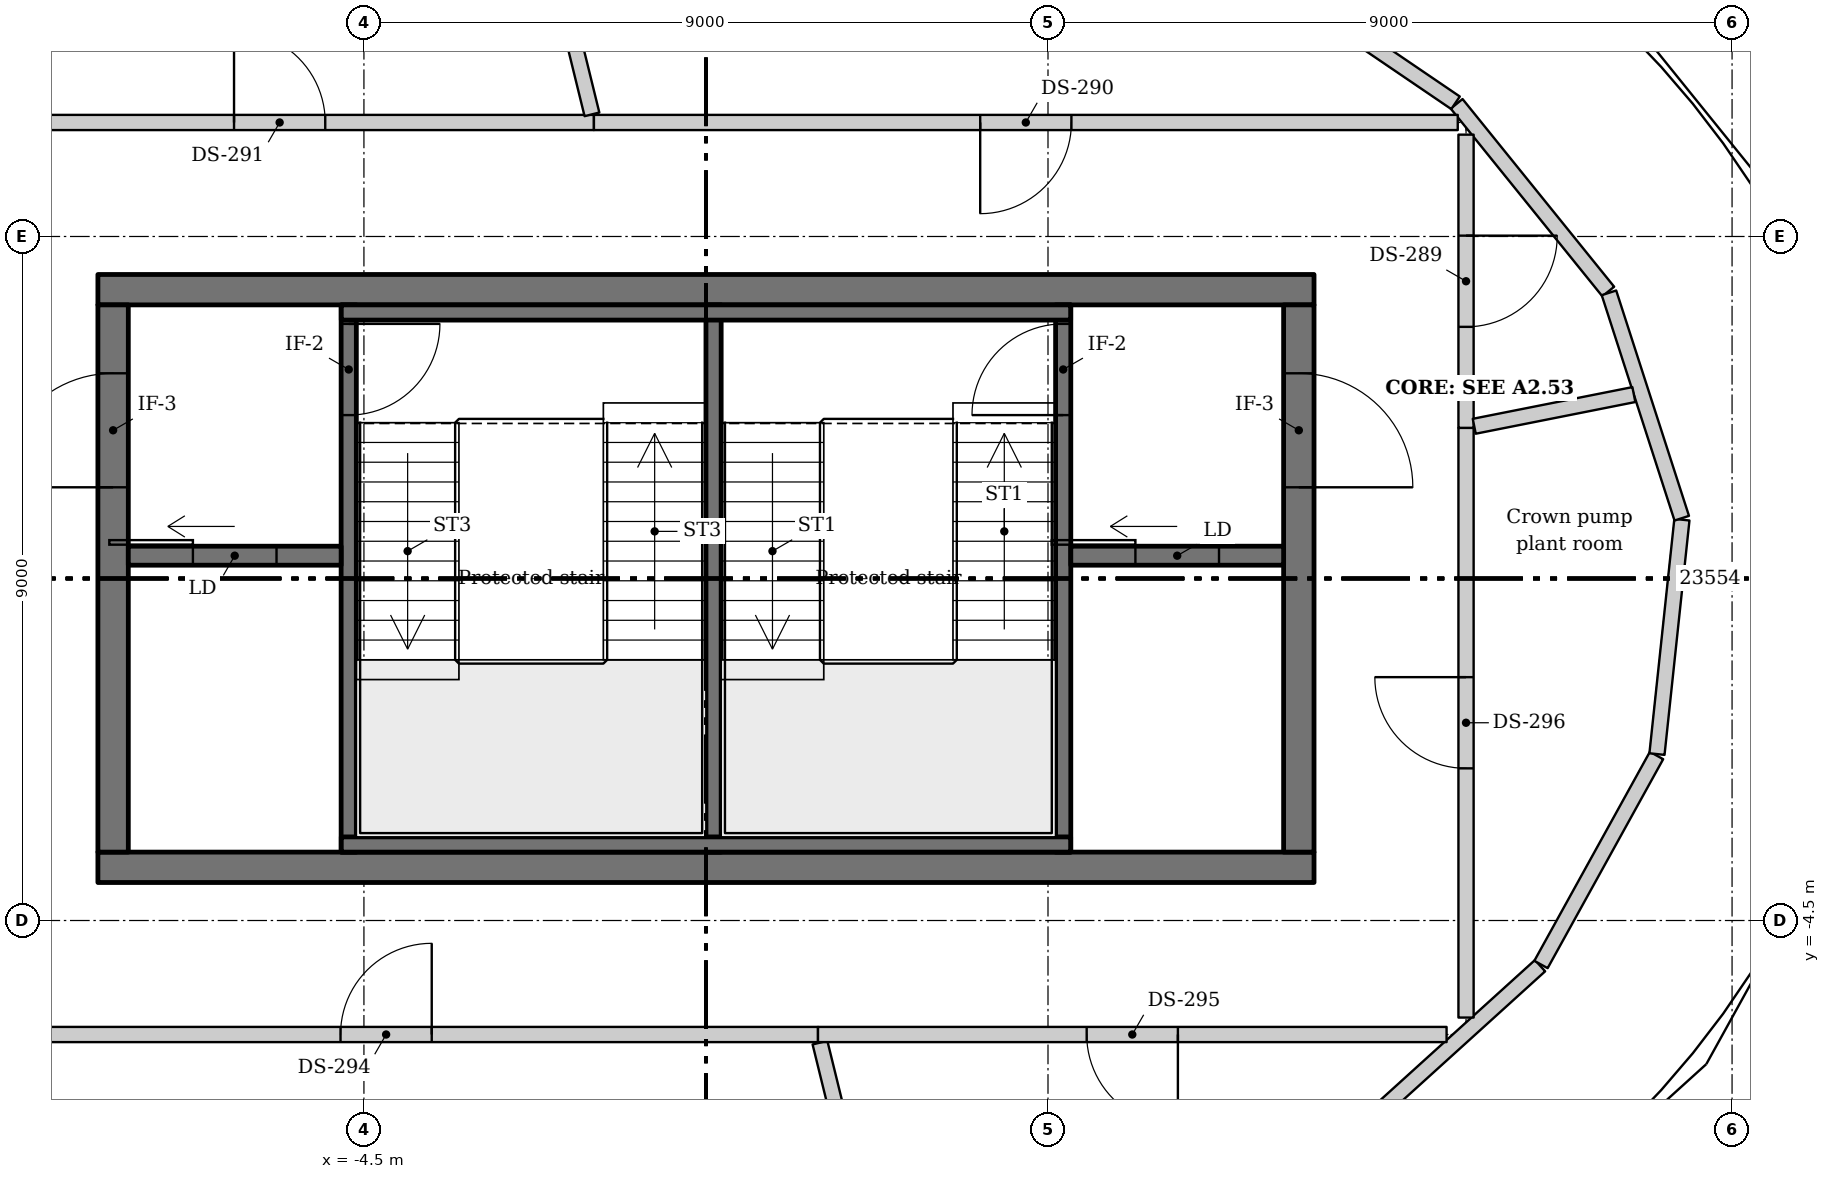
"""IFC4 building model, lengths in metres.
Left out: names, types, materials, properties, quantities, classifications, styles, units other than length and angle.
Written with IfcOpenShell. Run it as: python <this file> out.ifc"""

import sys

from ifc_helpers import new_model, si_unit, direction, frame, frame_2d, origin, place, context, subcontext, project, spatial, rectangle, extrude, source, transform, mapped, element, fill, save


model = new_model("IFC4")
c1 = context("Model", 3, precision=1e-05, world=origin(), true_north=direction((0.0, 1.0)))
c2 = subcontext(c1, "Body", "Model", "MODEL_VIEW")
j1 = project(units=[si_unit("LENGTHUNIT", "METRE"), si_unit("PLANEANGLEUNIT", "RADIAN")], contexts=[c1])
p1 = place(None, origin())
s1 = spatial("IfcSite", under=j1, at=p1, CompositionType="ELEMENT")
p2 = place(p1, origin())
s2 = spatial("IfcBuilding", under=s1, at=p2, CompositionType="ELEMENT")
p3 = place(p2, frame((0.0, 0.0, 365.5)))
s3 = spatial("IfcBuildingStorey", under=s2, at=p3, CompositionType="ELEMENT", Elevation=365.5)
m1 = source(origin(), c2, "Body", "SweptSolid", [
    extrude(rectangle(XDim=16.0, YDim=0.4, at=frame_2d((8.0, 0.0))), origin(), (0.0, 0.0, 1.0), 4.5),
])
for number, where, z_axis, x_axis in (
    (1, (-8.0, 3.8, -0.25), (0.0, 0.0, 1.0), (1.0, 0.0, 0.0)),
    (2, (-8.0, -3.8, -0.25), (0.0, 0.0, 1.0), (1.0, 0.0, 0.0)),
):
    element("IfcWall", number, at=place(p3, frame(where, z_axis=z_axis, x_axis=x_axis)), inside=s3, PredefinedType="SHEAR", context=c2, shape_type="MappedRepresentation", body=[
        mapped(m1, transform((0.0, 0.0, 0.0))),
    ])
m2 = source(origin(), c2, "Body", "SweptSolid", [
    extrude(rectangle(XDim=7.2, YDim=0.4, at=frame_2d((3.6, 0.0))), origin(), (0.0, 0.0, 1.0), 4.5),
])
p4 = place(p3, frame((7.8, -3.6, -0.25), z_axis=(0.0, 0.0, 1.0), x_axis=(0.0, 1.0, 0.0)))
e3 = element("IfcWall", 3, at=p4, inside=s3, PredefinedType="SHEAR", context=c2, shape_type="MappedRepresentation", body=[
    mapped(m2, transform((0.0, 0.0, 0.0))),
])
m3 = source(origin(), c2, "Body", "SweptSolid", [
    extrude(rectangle(XDim=1.5, YDim=2.1, at=frame_2d((0.75, 1.05))), frame((0.0, 0.21, 0.0), z_axis=(0.0, -1.0, 0.0), x_axis=(1.0, 0.0, 0.0)), (0.0, 0.0, 1.0), 0.42),
])
p5 = place(p4, frame((4.8, 0.0, 0.25)))
e4 = element("IfcOpeningElement", 4, at=p5, cuts=e3, PredefinedType="OPENING", context=c2, shape_type="MappedRepresentation", body=[
    mapped(m3, transform((0.0, 0.0, 0.0))),
])
p6 = place(p3, frame((-7.8, -3.6, -0.25), z_axis=(0.0, 0.0, 1.0), x_axis=(0.0, 1.0, 0.0)))
e5 = element("IfcWall", 5, at=p6, inside=s3, PredefinedType="SHEAR", context=c2, shape_type="MappedRepresentation", body=[
    mapped(m2, transform((0.0, 0.0, 0.0))),
])
p7 = place(p6, frame((4.8, 0.0, 0.25)))
e6 = element("IfcOpeningElement", 6, at=p7, cuts=e5, PredefinedType="OPENING", context=c2, shape_type="MappedRepresentation", body=[
    mapped(m3, transform((0.0, 0.0, 0.0))),
])
m4 = source(origin(), c2, "Body", "SweptSolid", [
    extrude(rectangle(XDim=3.175, YDim=0.2, at=frame_2d((1.587, 0.0))), origin(), (0.0, 0.0, 1.0), 4.25),
])
p8 = place(p3, frame((9.876, 6.246, 0.0), z_axis=(0.0, 0.0, 1.0), x_axis=(0.628308465475, -0.777964312943, 0.0)))
e7 = element("IfcWall", 7, at=p8, inside=s3, PredefinedType="SOLIDWALL", context=c2, shape_type="MappedRepresentation", body=[
    mapped(m4, transform((0.0, 0.0, 0.0))),
])
m5 = source(origin(), c2, "Body", "SweptSolid", [
    extrude(rectangle(XDim=3.23, YDim=0.2, at=frame_2d((1.615, 0.0))), origin(), (0.0, 0.0, 1.0), 4.25),
])
p9 = place(p3, frame((7.191, 8.076, 0.0), z_axis=(0.0, 0.0, 1.0), x_axis=(0.826887140507, -0.562367901701, 0.0)))
e8 = element("IfcWall", 8, at=p9, inside=s3, PredefinedType="SOLIDWALL", context=c2, shape_type="MappedRepresentation", body=[
    mapped(m5, transform((0.0, 0.0, 0.0))),
])
m6 = source(origin(), c2, "Body", "SweptSolid", [
    extrude(rectangle(XDim=3.205, YDim=0.2, at=frame_2d((1.603, 0.0))), origin(), (0.0, 0.0, 1.0), 4.25),
])
p10 = place(p3, frame((-10.974, 5.094, 0.0), z_axis=(0.0, 0.0, 1.0), x_axis=(0.741131432131, 0.671359963289, 0.0)))
e9 = element("IfcWall", 9, at=p10, inside=s3, PredefinedType="SOLIDWALL", context=c2, shape_type="MappedRepresentation", body=[
    mapped(m6, transform((0.0, 0.0, 0.0))),
])
p11 = place(p3, frame((-7.191, -8.076, 0.0), z_axis=(0.0, 0.0, 1.0), x_axis=(-0.826887140507, 0.562367901701, 0.0)))
e10 = element("IfcWall", 10, at=p11, inside=s3, PredefinedType="SOLIDWALL", context=c2, shape_type="MappedRepresentation", body=[
    mapped(m5, transform((0.0, 0.0, 0.0))),
])
p12 = place(p3, frame((10.974, -5.094, 0.0), z_axis=(0.0, 0.0, 1.0), x_axis=(-0.741131432131, -0.671359963289, 0.0)))
e11 = element("IfcWall", 11, at=p12, inside=s3, PredefinedType="SOLIDWALL", context=c2, shape_type="MappedRepresentation", body=[
    mapped(m6, transform((0.0, 0.0, 0.0))),
])
m7 = source(origin(), c2, "Body", "SweptSolid", [
    extrude(rectangle(XDim=3.142, YDim=0.2, at=frame_2d((1.571, 0.0))), origin(), (0.0, 0.0, 1.0), 4.25),
])
p13 = place(p3, frame((12.506, -2.329, 0.0), z_axis=(0.0, 0.0, 1.0), x_axis=(-0.48375502956, -0.875203445706, 0.0)))
e12 = element("IfcWall", 12, at=p13, inside=s3, PredefinedType="SOLIDWALL", context=c2, shape_type="MappedRepresentation", body=[
    mapped(m7, transform((0.0, 0.0, 0.0))),
])
m8 = source(origin(), c2, "Body", "SweptSolid", [
    extrude(rectangle(XDim=3.101, YDim=0.2, at=frame_2d((1.551, 0.0))), origin(), (0.0, 0.0, 1.0), 4.25),
])
p14 = place(p3, frame((12.84, 0.774, 0.0), z_axis=(0.0, 0.0, 1.0), x_axis=(-0.105721464197, -0.994395782376, 0.0)))
e13 = element("IfcWall", 13, at=p14, inside=s3, PredefinedType="SOLIDWALL", context=c2, shape_type="MappedRepresentation", body=[
    mapped(m8, transform((0.0, 0.0, 0.0))),
])
m9 = source(origin(), c2, "Body", "SweptSolid", [
    extrude(rectangle(XDim=3.116, YDim=0.2, at=frame_2d((1.558, 0.0))), origin(), (0.0, 0.0, 1.0), 4.25),
])
p15 = place(p3, frame((11.881, 3.759, 0.0), z_axis=(0.0, 0.0, 1.0), x_axis=(0.307282044067, -0.951618487312, 0.0)))
e14 = element("IfcWall", 14, at=p15, inside=s3, PredefinedType="SOLIDWALL", context=c2, shape_type="MappedRepresentation", body=[
    mapped(m9, transform((0.0, 0.0, 0.0))),
])
m10 = source(origin(), c2, "Body", "SweptSolid", [
    extrude(rectangle(XDim=7.2, YDim=0.2, at=frame_2d((3.6, 0.0))), origin(), (0.0, 0.0, 1.0), 4.25),
])
p16 = place(p3, frame((0.1, 3.6, 0.0), z_axis=(0.0, 0.0, 1.0), x_axis=(0.0, -1.0, 0.0)))
e15 = element("IfcWall", 15, at=p16, inside=s3, PredefinedType="SHEAR", context=c2, shape_type="MappedRepresentation", body=[
    mapped(m10, transform((0.0, 0.0, 0.0))),
])
p17 = place(p3, frame((4.7, -3.6, 0.0), z_axis=(0.0, 0.0, 1.0), x_axis=(0.0, 1.0, 0.0)))
e16 = element("IfcWall", 16, at=p17, inside=s3, PredefinedType="SHEAR", context=c2, shape_type="MappedRepresentation", body=[
    mapped(m10, transform((0.0, 0.0, 0.0))),
])
m11 = source(origin(), c2, "Body", "SweptSolid", [
    extrude(rectangle(XDim=1.2, YDim=2.1, at=frame_2d((0.6, 1.05))), frame((0.0, 0.11, 0.0), z_axis=(0.0, -1.0, 0.0), x_axis=(1.0, 0.0, 0.0)), (0.0, 0.0, 1.0), 0.22),
])
p18 = place(p17, frame((5.75, 0.0, 0.0)))
e17 = element("IfcOpeningElement", 17, at=p18, cuts=e16, PredefinedType="OPENING", context=c2, shape_type="MappedRepresentation", body=[
    mapped(m11, transform((0.0, 0.0, 0.0))),
])
p19 = place(p3, frame((-4.7, 3.6, 0.0), z_axis=(0.0, 0.0, 1.0), x_axis=(0.0, -1.0, 0.0)))
e18 = element("IfcWall", 18, at=p19, inside=s3, PredefinedType="SHEAR", context=c2, shape_type="MappedRepresentation", body=[
    mapped(m10, transform((0.0, 0.0, 0.0))),
])
p20 = place(p19, frame((0.25, 0.0, 0.0)))
e19 = element("IfcOpeningElement", 19, at=p20, cuts=e18, PredefinedType="OPENING", context=c2, shape_type="MappedRepresentation", body=[
    mapped(m11, transform((0.0, 0.0, 0.0))),
])
m12 = source(origin(), c2, "Body", "SweptSolid", [
    extrude(rectangle(XDim=2.8, YDim=0.25, at=frame_2d((1.4, 0.0))), origin(), (0.0, 0.0, 1.0), 4.25),
])
p21 = place(p3, frame((7.6, 0.3, 0.0), z_axis=(0.0, 0.0, 1.0), x_axis=(-1.0, 0.0, 0.0)))
e20 = element("IfcWall", 20, at=p21, inside=s3, PredefinedType="SHEAR", context=c2, shape_type="MappedRepresentation", body=[
    mapped(m12, transform((0.0, 0.0, 0.0))),
])
m13 = source(origin(), c2, "Body", "SweptSolid", [
    extrude(rectangle(XDim=1.1, YDim=2.1, at=frame_2d((0.55, 1.05))), frame((0.0, 0.135, 0.0), z_axis=(0.0, -1.0, 0.0), x_axis=(1.0, 0.0, 0.0)), (0.0, 0.0, 1.0), 0.27),
])
p22 = place(p21, frame((0.85, 0.0, 0.0)))
e21 = element("IfcOpeningElement", 21, at=p22, cuts=e20, PredefinedType="OPENING", context=c2, shape_type="MappedRepresentation", body=[
    mapped(m13, transform((0.0, 0.0, 0.0))),
])
p23 = place(p3, frame((-4.8, 0.3, 0.0), z_axis=(0.0, 0.0, 1.0), x_axis=(-1.0, 0.0, 0.0)))
e22 = element("IfcWall", 22, at=p23, inside=s3, PredefinedType="SHEAR", context=c2, shape_type="MappedRepresentation", body=[
    mapped(m12, transform((0.0, 0.0, 0.0))),
])
p24 = place(p23, frame((0.85, 0.0, 0.0)))
e23 = element("IfcOpeningElement", 23, at=p24, cuts=e22, PredefinedType="OPENING", context=c2, shape_type="MappedRepresentation", body=[
    mapped(m13, transform((0.0, 0.0, 0.0))),
])
m14 = source(origin(), c2, "Body", "SweptSolid", [
    extrude(rectangle(XDim=9.596, YDim=0.2, at=frame_2d((4.798, 0.0))), origin(), (0.0, 0.0, 1.0), 4.25),
])
for number, where, z_axis, x_axis in (
    (24, (-4.798, -3.5, 0.0), (0.0, 0.0, 1.0), (1.0, 0.0, 0.0)),
    (25, (4.798, 3.5, 0.0), (0.0, 0.0, 1.0), (-1.0, 0.0, 0.0)),
):
    element("IfcWall", number, at=place(p3, frame(where, z_axis=z_axis, x_axis=x_axis)), inside=s3, PredefinedType="SHEAR", context=c2, shape_type="MappedRepresentation", body=[
        mapped(m14, transform((0.0, 0.0, 0.0))),
    ])
m15 = source(origin(), c2, "Body", "SweptSolid", [
    extrude(rectangle(XDim=8.27, YDim=0.2, at=frame_2d((4.135, 0.0))), origin(), (0.0, 0.0, 1.0), 4.25),
])
p25 = place(p3, frame((-9.744, 6.0, 0.0), z_axis=(0.0, 0.0, 1.0), x_axis=(1.0, 0.0, 0.0)))
e26 = element("IfcWall", 26, at=p25, inside=s3, PredefinedType="PARTITIONING", context=c2, shape_type="MappedRepresentation", body=[
    mapped(m15, transform((0.0, 0.0, 0.0))),
])
p26 = place(p25, frame((3.535, 0.0, 0.0)))
e27 = element("IfcOpeningElement", 27, at=p26, cuts=e26, PredefinedType="OPENING", context=c2, shape_type="MappedRepresentation", body=[
    mapped(m11, transform((0.0, 0.0, 0.0))),
])
m16 = source(origin(), c2, "Body", "SweptSolid", [
    extrude(rectangle(XDim=3.458, YDim=0.2, at=frame_2d((1.729, 0.0))), origin(), (0.0, 0.0, 1.0), 4.25),
])
p27 = place(p3, frame((-1.5, 6.107, 0.0), z_axis=(0.0, 0.0, 1.0), x_axis=(-0.238563284271, 0.971126953286, 0.0)))
e28 = element("IfcWall", 28, at=p27, inside=s3, PredefinedType="PARTITIONING", context=c2, shape_type="MappedRepresentation", body=[
    mapped(m16, transform((0.0, 0.0, 0.0))),
])
m17 = source(origin(), c2, "Body", "SweptSolid", [
    extrude(rectangle(XDim=11.365, YDim=0.2, at=frame_2d((5.683, 0.0))), origin(), (0.0, 0.0, 1.0), 4.25),
])
p28 = place(p3, frame((-1.474, 6.0, 0.0), z_axis=(0.0, 0.0, 1.0), x_axis=(1.0, 0.0, 0.0)))
e29 = element("IfcWall", 29, at=p28, inside=s3, PredefinedType="PARTITIONING", context=c2, shape_type="MappedRepresentation", body=[
    mapped(m17, transform((0.0, 0.0, 0.0))),
])
p29 = place(p28, frame((5.082, 0.0, 0.0)))
e30 = element("IfcOpeningElement", 30, at=p29, cuts=e29, PredefinedType="OPENING", context=c2, shape_type="MappedRepresentation", body=[
    mapped(m11, transform((0.0, 0.0, 0.0))),
])
p30 = place(p3, frame((1.474, -6.0, 0.0), z_axis=(0.0, 0.0, 1.0), x_axis=(-1.0, 0.0, 0.0)))
e31 = element("IfcWall", 31, at=p30, inside=s3, PredefinedType="PARTITIONING", context=c2, shape_type="MappedRepresentation", body=[
    mapped(m17, transform((0.0, 0.0, 0.0))),
])
p31 = place(p30, frame((5.082, 0.0, 0.0)))
e32 = element("IfcOpeningElement", 32, at=p31, cuts=e31, PredefinedType="OPENING", context=c2, shape_type="MappedRepresentation", body=[
    mapped(m11, transform((0.0, 0.0, 0.0))),
])
p32 = place(p3, frame((1.5, -6.107, 0.0), z_axis=(0.0, 0.0, 1.0), x_axis=(0.238563284271, -0.971126953286, 0.0)))
e33 = element("IfcWall", 33, at=p32, inside=s3, PredefinedType="PARTITIONING", context=c2, shape_type="MappedRepresentation", body=[
    mapped(m16, transform((0.0, 0.0, 0.0))),
])
p33 = place(p3, frame((9.744, -6.0, 0.0), z_axis=(0.0, 0.0, 1.0), x_axis=(-1.0, 0.0, 0.0)))
e34 = element("IfcWall", 34, at=p33, inside=s3, PredefinedType="PARTITIONING", context=c2, shape_type="MappedRepresentation", body=[
    mapped(m15, transform((0.0, 0.0, 0.0))),
])
p34 = place(p33, frame((3.535, 0.0, 0.0)))
e35 = element("IfcOpeningElement", 35, at=p34, cuts=e34, PredefinedType="OPENING", context=c2, shape_type="MappedRepresentation", body=[
    mapped(m11, transform((0.0, 0.0, 0.0))),
])
m18 = source(origin(), c2, "Body", "SweptSolid", [
    extrude(rectangle(XDim=7.759, YDim=0.2, at=frame_2d((3.879, 0.0))), origin(), (0.0, 0.0, 1.0), 4.25),
])
p35 = place(p3, frame((10.0, 1.982, 0.0), z_axis=(0.0, 0.0, 1.0), x_axis=(0.0, -1.0, 0.0)))
e36 = element("IfcWall", 36, at=p35, inside=s3, PredefinedType="PARTITIONING", context=c2, shape_type="MappedRepresentation", body=[
    mapped(m18, transform((0.0, 0.0, 0.0))),
])
p36 = place(p35, frame((3.28, 0.0, 0.0)))
e37 = element("IfcOpeningElement", 37, at=p36, cuts=e36, PredefinedType="OPENING", context=c2, shape_type="MappedRepresentation", body=[
    mapped(m11, transform((0.0, 0.0, 0.0))),
])
m19 = source(origin(), c2, "Body", "SweptSolid", [
    extrude(rectangle(XDim=3.858, YDim=0.2, at=frame_2d((1.929, 0.0))), origin(), (0.0, 0.0, 1.0), 4.25),
])
p37 = place(p3, frame((10.0, 5.84, 0.0), z_axis=(0.0, 0.0, 1.0), x_axis=(0.0, -1.0, 0.0)))
e38 = element("IfcWall", 38, at=p37, inside=s3, PredefinedType="PARTITIONING", context=c2, shape_type="MappedRepresentation", body=[
    mapped(m19, transform((0.0, 0.0, 0.0))),
])
p38 = place(p37, frame((1.329, 0.0, 0.0)))
e39 = element("IfcOpeningElement", 39, at=p38, cuts=e38, PredefinedType="OPENING", context=c2, shape_type="MappedRepresentation", body=[
    mapped(m11, transform((0.0, 0.0, 0.0))),
])
m20 = source(origin(), c2, "Body", "SweptSolid", [
    extrude(rectangle(XDim=2.141, YDim=0.2, at=frame_2d((1.071, 0.0))), origin(), (0.0, 0.0, 1.0), 4.25),
])
p39 = place(p3, frame((12.208, 2.42, 0.0), z_axis=(0.0, 0.0, 1.0), x_axis=(-0.980851641364, -0.194756405888, 0.0)))
e40 = element("IfcWall", 40, at=p39, inside=s3, PredefinedType="PARTITIONING", context=c2, shape_type="MappedRepresentation", body=[
    mapped(m20, transform((0.0, 0.0, 0.0))),
])
m21 = source(origin(), c2, "Body", "SweptSolid", [
    extrude(rectangle(XDim=1.1, YDim=2.1, at=frame_2d((0.55, 1.05))), frame((0.0, 0.025, 0.0), z_axis=(0.0, -1.0, 0.0), x_axis=(1.0, 0.0, 0.0)), (0.0, 0.0, 1.0), 0.05),
])
p40 = place(p22, origin())
e41 = element("IfcDoor", 41, at=p40, inside=s3, OperationType="SLIDING_TO_RIGHT", PredefinedType="DOOR", context=c2, shape_type="MappedRepresentation", body=[
    mapped(m21, transform((0.0, 0.0, 0.0))),
])
fill(e21, e41)
m22 = source(origin(), c2, "Body", "SweptSolid", [
    extrude(rectangle(XDim=1.2, YDim=2.1, at=frame_2d((0.6, 1.05))), frame((0.0, 0.025, 0.0), z_axis=(0.0, -1.0, 0.0), x_axis=(1.0, 0.0, 0.0)), (0.0, 0.0, 1.0), 0.05),
])
p41 = place(p18, origin())
e42 = element("IfcDoor", 42, at=p41, inside=s3, OperationType="SINGLE_SWING_RIGHT", PredefinedType="DOOR", context=c2, shape_type="MappedRepresentation", body=[
    mapped(m22, transform((0.0, 0.0, 0.0))),
])
fill(e17, e42)
p42 = place(p24, origin())
e43 = element("IfcDoor", 43, at=p42, inside=s3, OperationType="SLIDING_TO_RIGHT", PredefinedType="DOOR", context=c2, shape_type="MappedRepresentation", body=[
    mapped(m21, transform((0.0, 0.0, 0.0))),
])
fill(e23, e43)
p43 = place(p20, origin())
e44 = element("IfcDoor", 44, at=p43, inside=s3, OperationType="SINGLE_SWING_LEFT", PredefinedType="DOOR", context=c2, shape_type="MappedRepresentation", body=[
    mapped(m22, transform((0.0, 0.0, 0.0))),
])
fill(e19, e44)
m23 = source(origin(), c2, "Body", "SweptSolid", [
    extrude(rectangle(XDim=1.5, YDim=2.1, at=frame_2d((0.75, 1.05))), frame((0.0, 0.025, 0.0), z_axis=(0.0, -1.0, 0.0), x_axis=(1.0, 0.0, 0.0)), (0.0, 0.0, 1.0), 0.05),
])
p44 = place(p5, origin())
e45 = element("IfcDoor", 45, at=p44, inside=s3, OperationType="DOUBLE_DOOR_SINGLE_SWING", PredefinedType="DOOR", context=c2, shape_type="MappedRepresentation", body=[
    mapped(m23, transform((0.0, 0.0, 0.0))),
])
fill(e4, e45)
p45 = place(p7, origin())
e46 = element("IfcDoor", 46, at=p45, inside=s3, OperationType="DOUBLE_DOOR_SINGLE_SWING", PredefinedType="DOOR", context=c2, shape_type="MappedRepresentation", body=[
    mapped(m23, transform((0.0, 0.0, 0.0))),
])
fill(e6, e46)
m24 = source(origin(), c2, "Body", "SweptSolid", [
    extrude(rectangle(XDim=1.2, YDim=2.1, at=frame_2d((0.6, 1.05))), frame((0.0, 0.025, 0.0), z_axis=(0.0, -1.0, 0.0), x_axis=(1.0, 0.0, 0.0)), (0.0, 0.0, 1.0), 0.05),
])
p46 = place(p38, origin())
e47 = element("IfcDoor", 47, at=p46, inside=s3, OperationType="SINGLE_SWING_LEFT", PredefinedType="DOOR", context=c2, shape_type="MappedRepresentation", body=[
    mapped(m24, transform((0.0, 0.0, 0.0))),
])
fill(e39, e47)
p47 = place(p29, origin())
e48 = element("IfcDoor", 48, at=p47, inside=s3, OperationType="SINGLE_SWING_LEFT", PredefinedType="DOOR", context=c2, shape_type="MappedRepresentation", body=[
    mapped(m24, transform((0.0, 0.0, 0.0))),
])
fill(e30, e48)
p48 = place(p26, origin())
e49 = element("IfcDoor", 49, at=p48, inside=s3, OperationType="SINGLE_SWING_LEFT", PredefinedType="DOOR", context=c2, shape_type="MappedRepresentation", body=[
    mapped(m24, transform((0.0, 0.0, 0.0))),
])
fill(e27, e49)
p49 = place(p31, origin())
e50 = element("IfcDoor", 50, at=p49, inside=s3, OperationType="SINGLE_SWING_LEFT", PredefinedType="DOOR", context=c2, shape_type="MappedRepresentation", body=[
    mapped(m24, transform((0.0, 0.0, 0.0))),
])
fill(e32, e50)
p50 = place(p34, origin())
e51 = element("IfcDoor", 51, at=p50, inside=s3, OperationType="SINGLE_SWING_LEFT", PredefinedType="DOOR", context=c2, shape_type="MappedRepresentation", body=[
    mapped(m24, transform((0.0, 0.0, 0.0))),
])
fill(e35, e51)
p51 = place(p36, origin())
e52 = element("IfcDoor", 52, at=p51, inside=s3, OperationType="SINGLE_SWING_LEFT", PredefinedType="DOOR", context=c2, shape_type="MappedRepresentation", body=[
    mapped(m24, transform((0.0, 0.0, 0.0))),
])
fill(e37, e52)
save(model, sys.argv[1])
